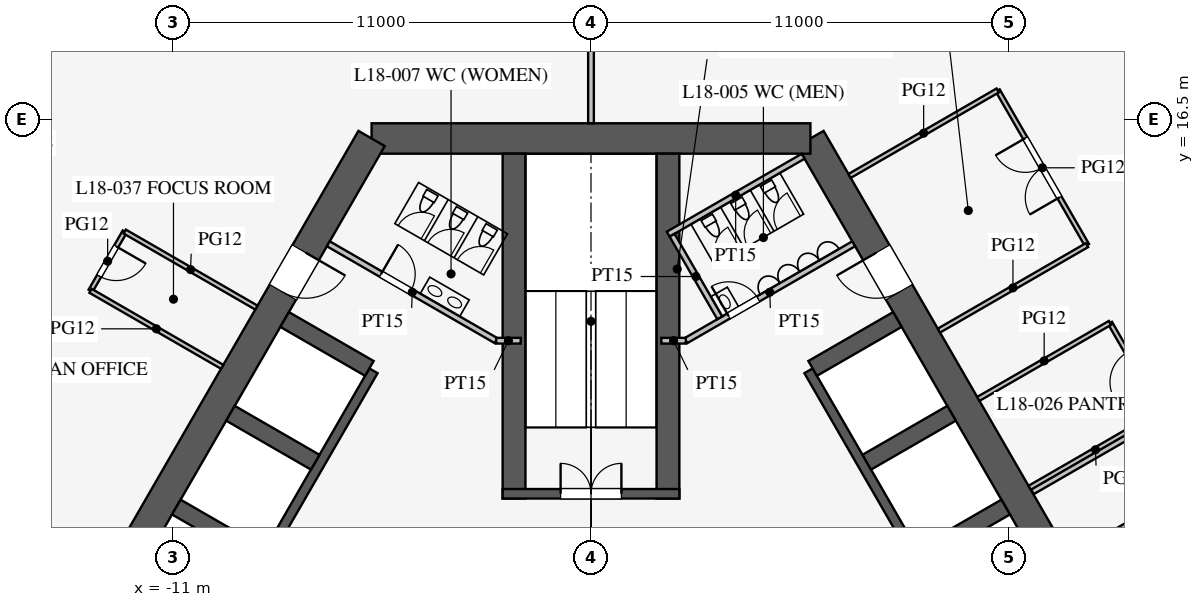
"""IFC4 building model, lengths in metres.
Left out: names, types, materials, properties, quantities, classifications, styles, units other than length and angle.
Written with IfcOpenShell. Run it as: python <this file> out.ifc"""

import sys

from ifc_helpers import new_model, si_unit, direction, frame, frame_2d, origin, place, context, subcontext, project, spatial, rectangle, extrude, element, fill, save


model = new_model("IFC4")
c1 = context("Model", 3, precision=1e-05, world=origin(), true_north=direction((0.0, 1.0)))
c2 = subcontext(c1, "Body", "Model", "MODEL_VIEW")
j1 = project(units=[si_unit("LENGTHUNIT", "METRE"), si_unit("PLANEANGLEUNIT", "RADIAN")], contexts=[c1])
p1 = place(None, origin())
s1 = spatial("IfcSite", under=j1, at=p1, CompositionType="ELEMENT")
p2 = place(p1, origin())
s2 = spatial("IfcBuilding", under=s1, at=p2, CompositionType="ELEMENT")
p3 = place(p2, frame((0.0, 0.0, 79.5)))
s3 = spatial("IfcBuildingStorey", under=s2, at=p3, CompositionType="ELEMENT", Elevation=79.5)
p4 = place(p3, frame((16.743, -3.0, 0.0), z_axis=(0.0, 0.0, 1.0), x_axis=(-0.500002442456, 0.866023993627, 0.0)))
e1 = element("IfcWall", 1, at=p4, inside=s3, PredefinedType="SHEAR", context=c2, shape_type="SweptSolid", body=[
    extrude(rectangle(XDim=21.939, YDim=0.8, at=frame_2d((10.97, 0.0))), origin(), (0.0, 0.0, 1.0), 4.2),
])
p5 = place(p4, frame((17.27, 0.0, 0.0)))
e2 = element("IfcOpeningElement", 2, at=p5, cuts=e1, PredefinedType="OPENING", context=c2, shape_type="SweptSolid", body=[
    extrude(rectangle(XDim=1.2, YDim=2.1, at=frame_2d((0.6, 1.05))), frame((0.0, 0.41, 0.0), z_axis=(0.0, -1.0, 0.0), x_axis=(1.0, 0.0, 0.0)), (0.0, 0.0, 1.0), 0.82),
])
p6 = place(p4, frame((3.47, 0.0, 0.0)))
e3 = element("IfcOpeningElement", 3, at=p6, cuts=e1, PredefinedType="OPENING", context=c2, shape_type="SweptSolid", body=[
    extrude(rectangle(XDim=1.2, YDim=2.1, at=frame_2d((0.6, 1.05))), frame((0.0, 0.41, 0.0), z_axis=(0.0, -1.0, 0.0), x_axis=(1.0, 0.0, 0.0)), (0.0, 0.0, 1.0), 0.82),
])
p7 = place(p3, frame((5.773, 16.0, 0.0), z_axis=(0.0, 0.0, 1.0), x_axis=(-1.0, 0.0, 0.0)))
e4 = element("IfcWall", 4, at=p7, inside=s3, PredefinedType="SHEAR", context=c2, shape_type="SweptSolid", body=[
    extrude(rectangle(XDim=11.547, YDim=0.8, at=frame_2d((5.773, 0.0))), origin(), (0.0, 0.0, 1.0), 4.2),
])
p8 = place(p3, frame((-5.773, 16.0, 0.0), z_axis=(0.0, 0.0, 1.0), x_axis=(-0.500002442456, -0.866023993627, 0.0)))
e5 = element("IfcWall", 5, at=p8, inside=s3, PredefinedType="SHEAR", context=c2, shape_type="SweptSolid", body=[
    extrude(rectangle(XDim=21.939, YDim=0.8, at=frame_2d((10.97, 0.0))), origin(), (0.0, 0.0, 1.0), 4.2),
])
p9 = place(p8, frame((17.27, 0.0, 0.0)))
e6 = element("IfcOpeningElement", 6, at=p9, cuts=e5, PredefinedType="OPENING", context=c2, shape_type="SweptSolid", body=[
    extrude(rectangle(XDim=1.2, YDim=2.1, at=frame_2d((0.6, 1.05))), frame((0.0, 0.41, 0.0), z_axis=(0.0, -1.0, 0.0), x_axis=(1.0, 0.0, 0.0)), (0.0, 0.0, 1.0), 0.82),
])
p10 = place(p8, frame((3.47, 0.0, 0.0)))
e7 = element("IfcOpeningElement", 7, at=p10, cuts=e5, PredefinedType="OPENING", context=c2, shape_type="SweptSolid", body=[
    extrude(rectangle(XDim=1.2, YDim=2.1, at=frame_2d((0.6, 1.05))), frame((0.0, 0.41, 0.0), z_axis=(0.0, -1.0, 0.0), x_axis=(1.0, 0.0, 0.0)), (0.0, 0.0, 1.0), 0.82),
])
p11 = place(p3, frame((11.424, 0.014, 0.0), z_axis=(0.0, 0.0, 1.0), x_axis=(-0.500001763848, 0.866024385424, 0.0)))
e8 = element("IfcWall", 8, at=p11, inside=s3, PredefinedType="SHEAR", context=c2, shape_type="SweptSolid", body=[
    extrude(rectangle(XDim=11.4, YDim=0.25, at=frame_2d((5.7, 0.0))), origin(), (0.0, 0.0, 1.0), 4.2),
])
for number, where, z_axis, x_axis in (
    (9, (8.682, 5.012, 0.0), (0.0, 0.0, 1.0), (0.866, 0.5, 0.0)),
    (10, (7.257, 7.481, 0.0), (0.0, 0.0, 1.0), (0.866, 0.5, 0.0)),
):
    element("IfcWall", number, at=place(p3, frame(where, z_axis=z_axis, x_axis=x_axis)), inside=s3, PredefinedType="SHEAR", context=c2, shape_type="SweptSolid", body=[
        extrude(rectangle(XDim=2.575, YDim=0.45, at=frame_2d((1.288, 0.0))), origin(), (0.0, 0.0, 1.0), 4.2),
    ])
p12 = place(p3, frame((5.832, 9.949, 0.0), z_axis=(0.0, 0.0, 1.0), x_axis=(0.866029291668, 0.499993265928, 0.0)))
e11 = element("IfcWall", 11, at=p12, inside=s3, PredefinedType="SHEAR", context=c2, shape_type="SweptSolid", body=[
    extrude(rectangle(XDim=2.575, YDim=0.45, at=frame_2d((1.288, 0.0))), origin(), (0.0, 0.0, 1.0), 4.2),
])
p13 = place(p3, frame((-5.724, 9.886, 0.0), z_axis=(0.0, 0.0, 1.0), x_axis=(-0.500001763848, -0.866024385424, 0.0)))
e12 = element("IfcWall", 12, at=p13, inside=s3, PredefinedType="SHEAR", context=c2, shape_type="SweptSolid", body=[
    extrude(rectangle(XDim=11.4, YDim=0.25, at=frame_2d((5.7, 0.0))), origin(), (0.0, 0.0, 1.0), 4.2),
])
p14 = place(p13, frame((6.525, 0.0, 0.0)))
e13 = element("IfcOpeningElement", 13, at=p14, cuts=e12, PredefinedType="OPENING", context=c2, shape_type="SweptSolid", body=[
    extrude(rectangle(XDim=1.2, YDim=2.2, at=frame_2d((0.6, 1.1))), frame((0.0, 0.135, 0.0), z_axis=(0.0, -1.0, 0.0), x_axis=(1.0, 0.0, 0.0)), (0.0, 0.0, 1.0), 0.27),
])
p15 = place(p13, frame((9.375, 0.0, 0.0)))
e14 = element("IfcOpeningElement", 14, at=p15, cuts=e12, PredefinedType="OPENING", context=c2, shape_type="SweptSolid", body=[
    extrude(rectangle(XDim=1.2, YDim=2.2, at=frame_2d((0.6, 1.1))), frame((0.0, 0.135, 0.0), z_axis=(0.0, -1.0, 0.0), x_axis=(1.0, 0.0, 0.0)), (0.0, 0.0, 1.0), 0.27),
])
p16 = place(p3, frame((-5.832, 9.949, 0.0), z_axis=(0.0, 0.0, 1.0), x_axis=(-0.866029291668, 0.499993265928, 0.0)))
e15 = element("IfcWall", 15, at=p16, inside=s3, PredefinedType="SHEAR", context=c2, shape_type="SweptSolid", body=[
    extrude(rectangle(XDim=2.575, YDim=0.45, at=frame_2d((1.288, 0.0))), origin(), (0.0, 0.0, 1.0), 4.2),
])
for number, where, z_axis, x_axis in (
    (16, (-7.257, 7.481, 0.0), (0.0, 0.0, 1.0), (-0.866, 0.5, 0.0)),
    (17, (-8.682, 5.012, 0.0), (0.0, 0.0, 1.0), (-0.866, 0.5, 0.0)),
):
    element("IfcWall", number, at=place(p3, frame(where, z_axis=z_axis, x_axis=x_axis)), inside=s3, PredefinedType="SHEAR", context=c2, shape_type="SweptSolid", body=[
        extrude(rectangle(XDim=2.575, YDim=0.45, at=frame_2d((1.288, 0.0))), origin(), (0.0, 0.0, 1.0), 4.2),
    ])
for number, where, z_axis, x_axis in (
    (18, (2.025, 6.525, 0.0), (0.0, 0.0, 1.0), (0.0, 1.0, 0.0)),
    (19, (-2.025, 6.525, 0.0), (0.0, 0.0, 1.0), (0.0, 1.0, 0.0)),
):
    element("IfcWall", number, at=place(p3, frame(where, z_axis=z_axis, x_axis=x_axis)), inside=s3, PredefinedType="SHEAR", context=c2, shape_type="SweptSolid", body=[
        extrude(rectangle(XDim=9.075, YDim=0.6, at=frame_2d((4.538, 0.0))), origin(), (0.0, 0.0, 1.0), 4.2),
    ])
p17 = place(p3, frame((2.325, 6.65, 0.0), z_axis=(0.0, 0.0, 1.0), x_axis=(-1.0, 0.0, 0.0)))
e20 = element("IfcWall", 20, at=p17, inside=s3, PredefinedType="SHEAR", context=c2, shape_type="SweptSolid", body=[
    extrude(rectangle(XDim=4.65, YDim=0.25, at=frame_2d((2.325, 0.0))), origin(), (0.0, 0.0, 1.0), 4.2),
])
p18 = place(p17, frame((1.525, 0.0, 0.0)))
e21 = element("IfcOpeningElement", 21, at=p18, cuts=e20, PredefinedType="OPENING", context=c2, shape_type="SweptSolid", body=[
    extrude(rectangle(XDim=1.6, YDim=2.1, at=frame_2d((0.8, 1.05))), frame((0.0, 0.135, 0.0), z_axis=(0.0, -1.0, 0.0), x_axis=(1.0, 0.0, 0.0)), (0.0, 0.0, 1.0), 0.27),
])
p19 = place(p3, frame((2.495, 10.678, 0.0), z_axis=(0.0, 0.0, 1.0), x_axis=(0.86602216432, 0.500005610874, 0.0)))
e22 = element("IfcWall", 22, at=p19, inside=s3, PredefinedType="PARTITIONING", context=c2, shape_type="SweptSolid", body=[
    extrude(rectangle(XDim=5.1, YDim=0.15, at=frame_2d((2.55, 0.0))), origin(), (0.0, 0.0, 1.0), 4.0),
])
p20 = place(p19, frame((1.3, 0.0, 0.0)))
e23 = element("IfcOpeningElement", 23, at=p20, cuts=e22, PredefinedType="OPENING", context=c2, shape_type="SweptSolid", body=[
    extrude(rectangle(XDim=0.9, YDim=2.1, at=frame_2d((0.45, 1.05))), frame((0.0, 0.085, 0.0), z_axis=(0.0, -1.0, 0.0), x_axis=(1.0, 0.0, 0.0)), (0.0, 0.0, 1.0), 0.17),
])
p21 = place(p3, frame((-2.495, 10.678, 0.0), z_axis=(0.0, 0.0, 1.0), x_axis=(-0.86602216432, 0.500005610874, 0.0)))
e24 = element("IfcWall", 24, at=p21, inside=s3, PredefinedType="PARTITIONING", context=c2, shape_type="SweptSolid", body=[
    extrude(rectangle(XDim=5.1, YDim=0.15, at=frame_2d((2.55, 0.0))), origin(), (0.0, 0.0, 1.0), 4.0),
])
p22 = place(p21, frame((2.6, 0.0, 0.0)))
e25 = element("IfcOpeningElement", 25, at=p22, cuts=e24, PredefinedType="OPENING", context=c2, shape_type="SweptSolid", body=[
    extrude(rectangle(XDim=0.9, YDim=2.1, at=frame_2d((0.45, 1.05))), frame((0.0, 0.085, 0.0), z_axis=(0.0, -1.0, 0.0), x_axis=(1.0, 0.0, 0.0)), (0.0, 0.0, 1.0), 0.17),
])
for number, where, z_axis, x_axis in (
    (26, (2.495, 10.678, 0.0), (0.0, 0.0, 1.0), (-1.0, 0.0, 0.0)),
    (27, (-2.495, 10.678, 0.0), (0.0, 0.0, 1.0), (1.0, 0.0, 0.0)),
):
    element("IfcWall", number, at=place(p3, frame(where, z_axis=z_axis, x_axis=x_axis)), inside=s3, PredefinedType="PARTITIONING", context=c2, shape_type="SweptSolid", body=[
        extrude(rectangle(XDim=0.645, YDim=0.15, at=frame_2d((0.323, 0.0))), origin(), (0.0, 0.0, 1.0), 4.0),
    ])
p23 = place(p3, frame((2.031, 13.482, 0.0), z_axis=(0.0, 0.0, 1.0), x_axis=(0.866050731258, 0.499956128963, 0.0)))
e28 = element("IfcWall", 28, at=p23, inside=s3, PredefinedType="PARTITIONING", context=c2, shape_type="SweptSolid", body=[
    extrude(rectangle(XDim=4.1, YDim=0.15, at=frame_2d((2.05, 0.0))), origin(), (0.0, 0.0, 1.0), 4.0),
])
p24 = place(p3, frame((3.389, 11.281, 0.0), z_axis=(0.0, 0.0, 1.0), x_axis=(-0.499989096993, 0.866031698547, 0.0)))
e29 = element("IfcWall", 29, at=p24, inside=s3, PredefinedType="PARTITIONING", context=c2, shape_type="SweptSolid", body=[
    extrude(rectangle(XDim=2.51, YDim=0.15, at=frame_2d((1.255, 0.0))), origin(), (0.0, 0.0, 1.0), 4.0),
])
p25 = place(p3, frame((0.0, 16.4, 0.0), z_axis=(0.0, 0.0, 1.0), x_axis=(0.0, 1.0, 0.0)))
e30 = element("IfcWall", 30, at=p25, inside=s3, PredefinedType="PARTITIONING", context=c2, shape_type="SweptSolid", body=[
    extrude(rectangle(XDim=18.25, YDim=0.15, at=frame_2d((9.125, 0.0))), origin(), (0.0, 0.0, 1.0), 2.3),
])
p26 = place(p3, frame((11.613, 6.705, 0.0), z_axis=(0.0, 0.0, 1.0), x_axis=(0.866029791586, 0.499992400027, 0.0)))
e31 = element("IfcWall", 31, at=p26, inside=s3, PredefinedType="PARTITIONING", context=c2, shape_type="SweptSolid", body=[
    extrude(rectangle(XDim=12.709, YDim=0.15, at=frame_2d((6.354, 0.0))), origin(), (0.0, 0.0, 1.0), 2.8),
])
p27 = place(p3, frame((15.006, 8.808, 0.0), z_axis=(0.0, 0.0, 1.0), x_axis=(-0.500048589285, 0.86599734893, 0.0)))
e32 = element("IfcWall", 32, at=p27, inside=s3, PredefinedType="PARTITIONING", context=c2, shape_type="SweptSolid", body=[
    extrude(rectangle(XDim=2.7, YDim=0.12, at=frame_2d((1.35, 0.0))), origin(), (0.0, 0.0, 1.0), 2.9),
])
p28 = place(p27, frame((0.9, 0.0, 0.15)))
e33 = element("IfcOpeningElement", 33, at=p28, cuts=e32, PredefinedType="OPENING", context=c2, shape_type="SweptSolid", body=[
    extrude(rectangle(XDim=0.9, YDim=2.1, at=frame_2d((0.45, 1.05))), frame((0.0, 0.07, 0.0), z_axis=(0.0, -1.0, 0.0), x_axis=(1.0, 0.0, 0.0)), (0.0, 0.0, 1.0), 0.14),
])
p29 = place(p3, frame((13.052, 13.194, 0.0), z_axis=(0.0, 0.0, 1.0), x_axis=(-0.499977259774, 0.866038532462, 0.0)))
e34 = element("IfcWall", 34, at=p29, inside=s3, PredefinedType="PARTITIONING", context=c2, shape_type="SweptSolid", body=[
    extrude(rectangle(XDim=4.7, YDim=0.12, at=frame_2d((2.35, 0.0))), origin(), (0.0, 0.0, 1.0), 2.9),
])
p30 = place(p29, frame((1.45, 0.0, 0.15)))
e35 = element("IfcOpeningElement", 35, at=p30, cuts=e34, PredefinedType="OPENING", context=c2, shape_type="SweptSolid", body=[
    extrude(rectangle(XDim=1.8, YDim=2.1, at=frame_2d((0.9, 1.05))), frame((0.0, 0.07, 0.0), z_axis=(0.0, -1.0, 0.0), x_axis=(1.0, 0.0, 0.0)), (0.0, 0.0, 1.0), 0.14),
])
p31 = place(p3, frame((11.542, 6.808, 0.0), z_axis=(0.0, 0.0, 1.0), x_axis=(0.866026010844, 0.49999894854, 0.0)))
e36 = element("IfcWall", 36, at=p31, inside=s3, PredefinedType="PARTITIONING", context=c2, shape_type="SweptSolid", body=[
    extrude(rectangle(XDim=4.0, YDim=0.12, at=frame_2d((2.0, 0.0))), origin(), (0.0, 0.0, 1.0), 2.8),
])
p32 = place(p3, frame((10.192, 9.146, 0.0), z_axis=(0.0, 0.0, 1.0), x_axis=(0.866026010844, 0.49999894854, 0.0)))
e37 = element("IfcWall", 37, at=p32, inside=s3, PredefinedType="PARTITIONING", context=c2, shape_type="SweptSolid", body=[
    extrude(rectangle(XDim=4.0, YDim=0.12, at=frame_2d((2.0, 0.0))), origin(), (0.0, 0.0, 1.0), 2.9),
])
p33 = place(p3, frame((9.155, 10.944, 0.0), z_axis=(0.0, 0.0, 1.0), x_axis=(0.866017533419, 0.500013631625, 0.0)))
e38 = element("IfcWall", 38, at=p33, inside=s3, PredefinedType="PARTITIONING", context=c2, shape_type="SweptSolid", body=[
    extrude(rectangle(XDim=4.5, YDim=0.12, at=frame_2d((2.25, 0.0))), origin(), (0.0, 0.0, 1.0), 2.9),
])
p34 = place(p3, frame((6.805, 15.014, 0.0), z_axis=(0.0, 0.0, 1.0), x_axis=(0.866031096941, 0.499990139034, 0.0)))
e39 = element("IfcWall", 39, at=p34, inside=s3, PredefinedType="PARTITIONING", context=c2, shape_type="SweptSolid", body=[
    extrude(rectangle(XDim=4.5, YDim=0.12, at=frame_2d((2.25, 0.0))), origin(), (0.0, 0.0, 1.0), 2.9),
])
p35 = place(p3, frame((12.605, 4.968, 0.0), z_axis=(0.0, 0.0, 1.0), x_axis=(0.866026010844, 0.49999894854, 0.0)))
e40 = element("IfcWall", 40, at=p35, inside=s3, PredefinedType="PARTITIONING", context=c2, shape_type="SweptSolid", body=[
    extrude(rectangle(XDim=4.0, YDim=0.12, at=frame_2d((2.0, 0.0))), origin(), (0.0, 0.0, 1.0), 2.9),
])
p36 = place(p3, frame((-12.269, 13.55, 0.0), z_axis=(0.0, 0.0, 1.0), x_axis=(-0.500062916607, -0.865989075817, 0.0)))
e41 = element("IfcWall", 41, at=p36, inside=s3, PredefinedType="PARTITIONING", context=c2, shape_type="SweptSolid", body=[
    extrude(rectangle(XDim=1.8, YDim=0.12, at=frame_2d((0.9, 0.0))), origin(), (0.0, 0.0, 1.0), 2.9),
])
p37 = place(p36, frame((0.45, 0.0, 0.15)))
e42 = element("IfcOpeningElement", 42, at=p37, cuts=e41, PredefinedType="OPENING", context=c2, shape_type="SweptSolid", body=[
    extrude(rectangle(XDim=0.9, YDim=2.1, at=frame_2d((0.45, 1.05))), frame((0.0, 0.07, 0.0), z_axis=(0.0, -1.0, 0.0), x_axis=(1.0, 0.0, 0.0)), (0.0, 0.0, 1.0), 0.14),
])
for number, where, z_axis, x_axis in (
    (43, (-9.705, 9.991, 0.0), (0.0, 0.0, 1.0), (-0.866, 0.5, 0.0)),
    (44, (-8.805, 11.55, 0.0), (0.0, 0.0, 1.0), (-0.866, 0.5, 0.0)),
):
    element("IfcWall", number, at=place(p3, frame(where, z_axis=z_axis, x_axis=x_axis)), inside=s3, PredefinedType="PARTITIONING", context=c2, shape_type="SweptSolid", body=[
        extrude(rectangle(XDim=4.0, YDim=0.12, at=frame_2d((2.0, 0.0))), origin(), (0.0, 0.0, 1.0), 2.9),
    ])
p38 = place(p20, origin())
e45 = element("IfcDoor", 45, at=p38, inside=s3, OperationType="SINGLE_SWING_LEFT", PredefinedType="DOOR", context=c2, shape_type="SweptSolid", body=[
    extrude(rectangle(XDim=0.9, YDim=2.1, at=frame_2d((0.45, 1.05))), frame((0.0, 0.025, 0.0), z_axis=(0.0, -1.0, 0.0), x_axis=(1.0, 0.0, 0.0)), (0.0, 0.0, 1.0), 0.05),
])
fill(e23, e45)
p39 = place(p22, frame((0.9, 0.0, 0.0), z_axis=(0.0, 0.0, 1.0), x_axis=(-1.0, 0.0, 0.0)))
e46 = element("IfcDoor", 46, at=p39, inside=s3, OperationType="SINGLE_SWING_LEFT", PredefinedType="DOOR", context=c2, shape_type="SweptSolid", body=[
    extrude(rectangle(XDim=0.9, YDim=2.1, at=frame_2d((0.45, 1.05))), frame((0.0, 0.025, 0.0), z_axis=(0.0, -1.0, 0.0), x_axis=(1.0, 0.0, 0.0)), (0.0, 0.0, 1.0), 0.05),
])
fill(e25, e46)
p40 = place(p18, frame((1.6, 0.0, 0.0), z_axis=(0.0, 0.0, 1.0), x_axis=(-1.0, 0.0, 0.0)))
e47 = element("IfcDoor", 47, at=p40, inside=s3, OperationType="DOUBLE_DOOR_SINGLE_SWING", PredefinedType="DOOR", context=c2, shape_type="SweptSolid", body=[
    extrude(rectangle(XDim=1.6, YDim=2.1, at=frame_2d((0.8, 1.05))), frame((0.0, 0.025, 0.0), z_axis=(0.0, -1.0, 0.0), x_axis=(1.0, 0.0, 0.0)), (0.0, 0.0, 1.0), 0.05),
])
fill(e21, e47)
p41 = place(p5, origin())
e48 = element("IfcDoor", 48, at=p41, inside=s3, OperationType="SINGLE_SWING_RIGHT", PredefinedType="DOOR", context=c2, shape_type="SweptSolid", body=[
    extrude(rectangle(XDim=1.2, YDim=2.1, at=frame_2d((0.6, 1.05))), frame((0.0, 0.025, 0.0), z_axis=(0.0, -1.0, 0.0), x_axis=(1.0, 0.0, 0.0)), (0.0, 0.0, 1.0), 0.05),
])
fill(e2, e48)
p42 = place(p10, origin())
e49 = element("IfcDoor", 49, at=p42, inside=s3, OperationType="SINGLE_SWING_LEFT", PredefinedType="DOOR", context=c2, shape_type="SweptSolid", body=[
    extrude(rectangle(XDim=1.2, YDim=2.1, at=frame_2d((0.6, 1.05))), frame((0.0, 0.025, 0.0), z_axis=(0.0, -1.0, 0.0), x_axis=(1.0, 0.0, 0.0)), (0.0, 0.0, 1.0), 0.05),
])
fill(e7, e49)
p43 = place(p30, origin())
e50 = element("IfcDoor", 50, at=p43, inside=s3, OperationType="DOUBLE_DOOR_SINGLE_SWING", PredefinedType="DOOR", context=c2, shape_type="SweptSolid", body=[
    extrude(rectangle(XDim=1.8, YDim=2.1, at=frame_2d((0.9, 1.05))), frame((0.0, 0.025, 0.0), z_axis=(0.0, -1.0, 0.0), x_axis=(1.0, 0.0, 0.0)), (0.0, 0.0, 1.0), 0.05),
])
fill(e35, e50)
p44 = place(p37, origin())
e51 = element("IfcDoor", 51, at=p44, inside=s3, OperationType="SINGLE_SWING_LEFT", PredefinedType="DOOR", context=c2, shape_type="SweptSolid", body=[
    extrude(rectangle(XDim=0.9, YDim=2.1, at=frame_2d((0.45, 1.05))), frame((0.0, 0.025, 0.0), z_axis=(0.0, -1.0, 0.0), x_axis=(1.0, 0.0, 0.0)), (0.0, 0.0, 1.0), 0.05),
])
fill(e42, e51)
save(model, sys.argv[1])
